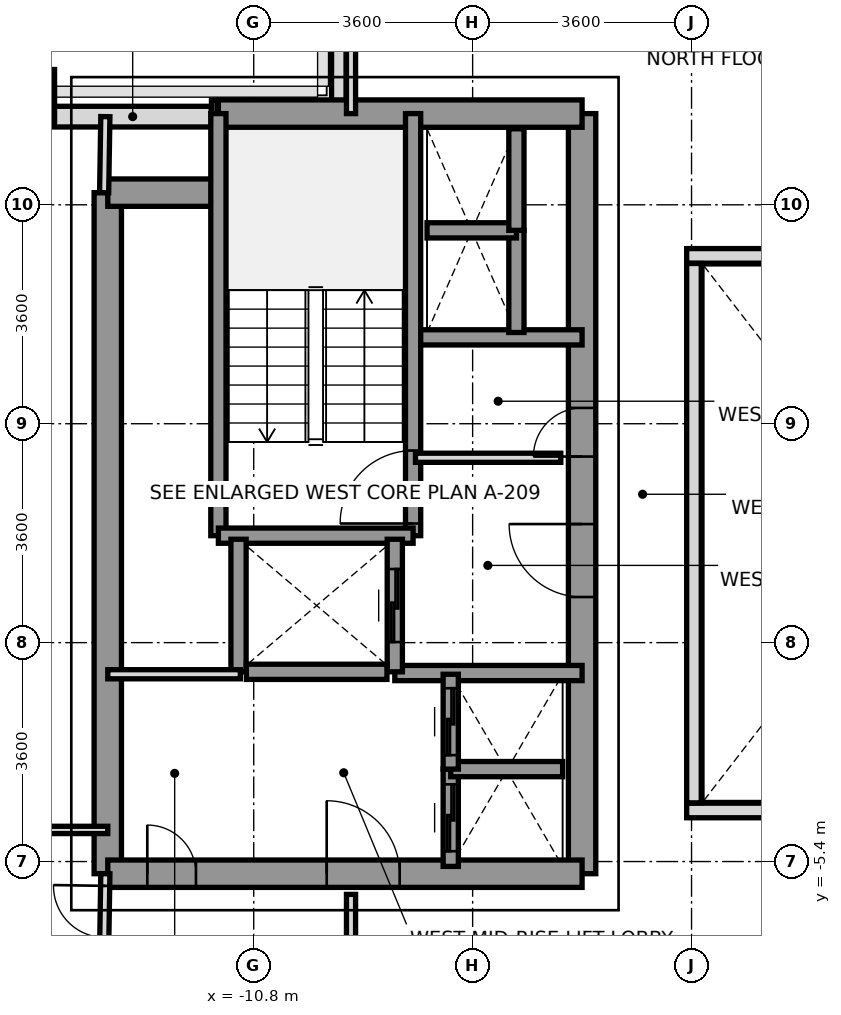
"""IFC4 building model, lengths in metres.
Left out: names, types, materials, properties, quantities, classifications, styles, units other than length and angle.
Written with IfcOpenShell. Run it as: python <this file> out.ifc"""

import sys

from ifc_helpers import new_model, si_unit, direction, frame, frame_2d, origin, origin_2d, place, context, subcontext, project, spatial, rectangle, extrude, source, transform, mapped, element, fill, save


model = new_model("IFC4")
c1 = context("Model", 3, precision=1e-05, world=origin(), true_north=direction((0.0, 1.0)))
c2 = subcontext(c1, "Body", "Model", "MODEL_VIEW")
j1 = project(units=[si_unit("LENGTHUNIT", "METRE"), si_unit("PLANEANGLEUNIT", "RADIAN")], contexts=[c1])
p1 = place(None, origin())
s1 = spatial("IfcSite", under=j1, at=p1, CompositionType="ELEMENT")
p2 = place(p1, origin())
s2 = spatial("IfcBuilding", under=s1, at=p2, CompositionType="ELEMENT")
p3 = place(p2, frame((0.0, 0.0, 148.2)))
s3 = spatial("IfcBuildingStorey", under=s2, at=p3, CompositionType="ELEMENT", Elevation=148.2)
m1 = source(origin(), c2, "Body", "SweptSolid", [
    extrude(rectangle(XDim=0.65, YDim=0.85, at=origin_2d()), origin(), (0.0, 0.0, 1.0), 3.14),
])
p4 = place(p3, frame((-14.4, 7.2, 0.0), z_axis=(0.0, 0.0, 1.0), x_axis=(1.0, 0.0, 0.0)))
e1 = element("IfcColumn", 1, at=p4, inside=s3, PredefinedType="COLUMN", context=c2, shape_type="MappedRepresentation", body=[
    mapped(m1, transform((0.0, 0.0, 0.0), x_axis=(1.0, 0.0, 0.0), y_axis=(0.0, 1.0, 0.0), z_axis=(0.0, 0.0, 1.0), scale=1.0)),
])
p5 = place(p3, frame((-14.083, 6.85, 0.0), z_axis=(0.0, 0.0, 1.0), x_axis=(1.0, 0.0, 0.0)))
e2 = element("IfcWall", 2, at=p5, inside=s3, PredefinedType="SOLIDWALL", context=c2, shape_type="SweptSolid", body=[
    extrude(rectangle(XDim=2.585, YDim=0.34, at=frame_2d((1.292, 0.0))), origin(), (0.0, 0.0, 1.0), 3.14),
])
p6 = place(p3, frame((-11.495, 7.0, 0.0), z_axis=(0.0, 0.0, 1.0), x_axis=(1.0, 0.0, 0.0)))
e3 = element("IfcWall", 3, at=p6, inside=s3, PredefinedType="PARAPET", context=c2, shape_type="SweptSolid", body=[
    extrude(rectangle(XDim=0.092, YDim=0.24, at=frame_2d((0.046, 0.0))), origin(), (0.0, 0.0, 1.0), 1.15),
])
p7 = place(p3, frame((-9.4, 6.953, 0.0), z_axis=(0.0, 0.0, 1.0), x_axis=(0.0, 1.0, 0.0)))
e4 = element("IfcWall", 4, at=p7, inside=s3, PredefinedType="PARAPET", context=c2, shape_type="SweptSolid", body=[
    extrude(rectangle(XDim=1.519, YDim=0.24, at=frame_2d((0.76, 0.0))), origin(), (0.0, 0.0, 1.0), 1.15),
])
p8 = place(p3, frame((-13.2, -5.6, 0.0), z_axis=(0.0, 0.0, 1.0), x_axis=(0.0, 1.0, 0.0)))
e5 = element("IfcWall", 5, at=p8, inside=s3, PredefinedType="SHEAR", context=c2, shape_type="SweptSolid", body=[
    extrude(rectangle(XDim=11.2, YDim=0.45, at=frame_2d((5.6, 0.0))), origin(), (0.0, 0.0, 1.0), 3.14),
])
p9 = place(p3, frame((-5.4, -5.6, 0.0), z_axis=(0.0, 0.0, 1.0), x_axis=(0.0, 1.0, 0.0)))
e6 = element("IfcWall", 6, at=p9, inside=s3, PredefinedType="SHEAR", context=c2, shape_type="SweptSolid", body=[
    extrude(rectangle(XDim=12.5, YDim=0.45, at=frame_2d((6.25, 0.0))), origin(), (0.0, 0.0, 1.0), 3.14),
])
p10 = place(p9, frame((4.55, 0.0, 0.0)))
e7 = element("IfcOpeningElement", 7, at=p10, cuts=e6, PredefinedType="OPENING", context=c2, shape_type="SweptSolid", body=[
    extrude(rectangle(XDim=1.2, YDim=2.2, at=frame_2d((0.6, 1.1))), frame((0.0, 0.235, 0.0), z_axis=(0.0, -1.0, 0.0), x_axis=(1.0, 0.0, 0.0)), (0.0, 0.0, 1.0), 0.47),
])
p11 = place(p9, frame((6.86, 0.0, 0.0)))
e8 = element("IfcOpeningElement", 8, at=p11, cuts=e6, PredefinedType="OPENING", context=c2, shape_type="SweptSolid", body=[
    extrude(rectangle(XDim=0.8, YDim=2.1, at=frame_2d((0.4, 1.05))), frame((0.0, 0.235, 0.0), z_axis=(0.0, -1.0, 0.0), x_axis=(1.0, 0.0, 0.0)), (0.0, 0.0, 1.0), 0.47),
])
p12 = place(p3, frame((-11.381, 6.9, 0.0), z_axis=(0.0, 0.0, 1.0), x_axis=(1.0, 0.0, 0.0)))
e9 = element("IfcWall", 9, at=p12, inside=s3, PredefinedType="SHEAR", context=c2, shape_type="SweptSolid", body=[
    extrude(rectangle(XDim=5.981, YDim=0.45, at=frame_2d((2.991, 0.0))), origin(), (0.0, 0.0, 1.0), 3.14),
])
p13 = place(p3, frame((-13.2, 5.6, 0.0), z_axis=(0.0, 0.0, 1.0), x_axis=(1.0, 0.0, 0.0)))
e10 = element("IfcWall", 10, at=p13, inside=s3, PredefinedType="SHEAR", context=c2, shape_type="SweptSolid", body=[
    extrude(rectangle(XDim=1.819, YDim=0.45, at=frame_2d((0.909, 0.0))), origin(), (0.0, 0.0, 1.0), 3.14),
])
p14 = place(p3, frame((-13.2, -5.6, 0.0), z_axis=(0.0, 0.0, 1.0), x_axis=(1.0, 0.0, 0.0)))
e11 = element("IfcWall", 11, at=p14, inside=s3, PredefinedType="SHEAR", context=c2, shape_type="SweptSolid", body=[
    extrude(rectangle(XDim=7.8, YDim=0.45, at=frame_2d((3.9, 0.0))), origin(), (0.0, 0.0, 1.0), 3.14),
])
p15 = place(p14, frame((3.6, 0.0, 0.0)))
e12 = element("IfcOpeningElement", 12, at=p15, cuts=e11, PredefinedType="OPENING", context=c2, shape_type="SweptSolid", body=[
    extrude(rectangle(XDim=1.2, YDim=2.2, at=frame_2d((0.6, 1.1))), frame((0.0, 0.235, 0.0), z_axis=(0.0, -1.0, 0.0), x_axis=(1.0, 0.0, 0.0)), (0.0, 0.0, 1.0), 0.47),
])
p16 = place(p14, frame((0.65, 0.0, 0.0)))
e13 = element("IfcOpeningElement", 13, at=p16, cuts=e11, PredefinedType="OPENING", context=c2, shape_type="SweptSolid", body=[
    extrude(rectangle(XDim=0.8, YDim=2.1, at=frame_2d((0.4, 1.05))), frame((0.0, 0.235, 0.0), z_axis=(0.0, -1.0, 0.0), x_axis=(1.0, 0.0, 0.0)), (0.0, 0.0, 1.0), 0.47),
])
p17 = place(p3, frame((-8.18, 3.22, 0.0), z_axis=(0.0, 0.0, 1.0), x_axis=(1.0, 0.0, 0.0)))
e14 = element("IfcWall", 14, at=p17, inside=s3, PredefinedType="SOLIDWALL", context=c2, shape_type="SweptSolid", body=[
    extrude(rectangle(XDim=2.78, YDim=0.25, at=frame_2d((1.39, 0.0))), origin(), (0.0, 0.0, 1.0), 3.14),
])
p18 = place(p3, frame((-8.48, -2.3, 0.0), z_axis=(0.0, 0.0, 1.0), x_axis=(1.0, 0.0, 0.0)))
e15 = element("IfcWall", 15, at=p18, inside=s3, PredefinedType="SOLIDWALL", context=c2, shape_type="SweptSolid", body=[
    extrude(rectangle(XDim=3.08, YDim=0.25, at=frame_2d((1.54, 0.0))), origin(), (0.0, 0.0, 1.0), 3.14),
])
p19 = place(p3, frame((-8.179, -0.041, 0.0), z_axis=(0.0, 0.0, 1.0), x_axis=(0.0, 1.0, 0.0)))
e16 = element("IfcWall", 16, at=p19, inside=s3, PredefinedType="SOLIDWALL", context=c2, shape_type="SweptSolid", body=[
    extrude(rectangle(XDim=6.941, YDim=0.25, at=frame_2d((3.47, 0.0))), origin(), (0.0, 0.0, 1.0), 3.14),
])
p20 = place(p19, frame((0.2, 0.0, 0.0)))
e17 = element("IfcOpeningElement", 17, at=p20, cuts=e16, PredefinedType="OPENING", context=c2, shape_type="SweptSolid", body=[
    extrude(rectangle(XDim=1.2, YDim=2.2, at=frame_2d((0.6, 1.1))), frame((0.0, 0.135, 0.0), z_axis=(0.0, -1.0, 0.0), x_axis=(1.0, 0.0, 0.0)), (0.0, 0.0, 1.0), 0.27),
])
p21 = place(p3, frame((-11.381, -0.041, 0.0), z_axis=(0.0, 0.0, 1.0), x_axis=(0.0, 1.0, 0.0)))
e18 = element("IfcWall", 18, at=p21, inside=s3, PredefinedType="SOLIDWALL", context=c2, shape_type="SweptSolid", body=[
    extrude(rectangle(XDim=6.941, YDim=0.25, at=frame_2d((3.47, 0.0))), origin(), (0.0, 0.0, 1.0), 3.14),
])
p22 = place(p3, frame((-11.381, -0.041, 0.0), z_axis=(0.0, 0.0, 1.0), x_axis=(1.0, 0.0, 0.0)))
e19 = element("IfcWall", 19, at=p22, inside=s3, PredefinedType="SOLIDWALL", context=c2, shape_type="SweptSolid", body=[
    extrude(rectangle(XDim=3.202, YDim=0.25, at=frame_2d((1.601, 0.0))), origin(), (0.0, 0.0, 1.0), 3.14),
])
p23 = place(p3, frame((-11.05, -2.28, 0.0), z_axis=(0.0, 0.0, 1.0), x_axis=(0.0, 1.0, 0.0)))
e20 = element("IfcWall", 20, at=p23, inside=s3, PredefinedType="SOLIDWALL", context=c2, shape_type="SweptSolid", body=[
    extrude(rectangle(XDim=2.18, YDim=0.25, at=frame_2d((1.09, 0.0))), origin(), (0.0, 0.0, 1.0), 3.14),
])
p24 = place(p3, frame((-8.48, -2.28, 0.0), z_axis=(0.0, 0.0, 1.0), x_axis=(0.0, 1.0, 0.0)))
e21 = element("IfcWall", 21, at=p24, inside=s3, PredefinedType="SOLIDWALL", context=c2, shape_type="SweptSolid", body=[
    extrude(rectangle(XDim=2.18, YDim=0.25, at=frame_2d((1.09, 0.0))), origin(), (0.0, 0.0, 1.0), 3.14),
])
p25 = place(p24, frame((0.49, 0.0, 0.0)))
e22 = element("IfcOpeningElement", 22, at=p25, cuts=e21, PredefinedType="OPENING", context=c2, shape_type="SweptSolid", body=[
    extrude(rectangle(XDim=1.2, YDim=2.2, at=frame_2d((0.6, 1.1))), frame((0.0, 0.135, 0.0), z_axis=(0.0, -1.0, 0.0), x_axis=(1.0, 0.0, 0.0)), (0.0, 0.0, 1.0), 0.27),
])
p26 = place(p3, frame((-10.921, -2.28, 0.0), z_axis=(0.0, 0.0, 1.0), x_axis=(1.0, 0.0, 0.0)))
e23 = element("IfcWall", 23, at=p26, inside=s3, PredefinedType="SOLIDWALL", context=c2, shape_type="SweptSolid", body=[
    extrude(rectangle(XDim=2.312, YDim=0.25, at=frame_2d((1.156, 0.0))), origin(), (0.0, 0.0, 1.0), 3.14),
])
p27 = place(p3, frame((-7.56, -5.48, 0.0), z_axis=(0.0, 0.0, 1.0), x_axis=(0.0, 1.0, 0.0)))
e24 = element("IfcWall", 24, at=p27, inside=s3, PredefinedType="SOLIDWALL", context=c2, shape_type="SweptSolid", body=[
    extrude(rectangle(XDim=1.6, YDim=0.25, at=frame_2d((0.8, 0.0))), origin(), (0.0, 0.0, 1.0), 3.14),
])
p28 = place(p27, frame((0.25, 0.0, 0.0)))
e25 = element("IfcOpeningElement", 25, at=p28, cuts=e24, PredefinedType="OPENING", context=c2, shape_type="SweptSolid", body=[
    extrude(rectangle(XDim=1.1, YDim=2.2, at=frame_2d((0.55, 1.1))), frame((0.0, 0.135, 0.0), z_axis=(0.0, -1.0, 0.0), x_axis=(1.0, 0.0, 0.0)), (0.0, 0.0, 1.0), 0.27),
])
p29 = place(p3, frame((-7.56, -3.88, 0.0), z_axis=(0.0, 0.0, 1.0), x_axis=(1.0, 0.0, 0.0)))
e26 = element("IfcWall", 26, at=p29, inside=s3, PredefinedType="SOLIDWALL", context=c2, shape_type="SweptSolid", body=[
    extrude(rectangle(XDim=1.84, YDim=0.25, at=frame_2d((0.92, 0.0))), origin(), (0.0, 0.0, 1.0), 3.14),
])
p30 = place(p3, frame((-7.56, -3.88, 0.0), z_axis=(0.0, 0.0, 1.0), x_axis=(0.0, 1.0, 0.0)))
e27 = element("IfcWall", 27, at=p30, inside=s3, PredefinedType="SOLIDWALL", context=c2, shape_type="SweptSolid", body=[
    extrude(rectangle(XDim=1.56, YDim=0.25, at=frame_2d((0.78, 0.0))), origin(), (0.0, 0.0, 1.0), 3.14),
])
p31 = place(p30, frame((0.23, 0.0, 0.0)))
e28 = element("IfcOpeningElement", 28, at=p31, cuts=e27, PredefinedType="OPENING", context=c2, shape_type="SweptSolid", body=[
    extrude(rectangle(XDim=1.1, YDim=2.2, at=frame_2d((0.55, 1.1))), frame((0.0, 0.135, 0.0), z_axis=(0.0, -1.0, 0.0), x_axis=(1.0, 0.0, 0.0)), (0.0, 0.0, 1.0), 0.27),
])
p32 = place(p3, frame((-6.48, 3.3, 0.0), z_axis=(0.0, 0.0, 1.0), x_axis=(0.0, 1.0, 0.0)))
e29 = element("IfcWall", 29, at=p32, inside=s3, PredefinedType="SOLIDWALL", context=c2, shape_type="SweptSolid", body=[
    extrude(rectangle(XDim=1.68, YDim=0.25, at=frame_2d((0.84, 0.0))), origin(), (0.0, 0.0, 1.0), 3.14),
])
p33 = place(p3, frame((-7.95, 4.98, 0.0), z_axis=(0.0, 0.0, 1.0), x_axis=(1.0, 0.0, 0.0)))
e30 = element("IfcWall", 30, at=p33, inside=s3, PredefinedType="SOLIDWALL", context=c2, shape_type="SweptSolid", body=[
    extrude(rectangle(XDim=1.47, YDim=0.25, at=frame_2d((0.735, 0.0))), origin(), (0.0, 0.0, 1.0), 3.14),
])
p34 = place(p3, frame((-6.48, 4.98, 0.0), z_axis=(0.0, 0.0, 1.0), x_axis=(0.0, 1.0, 0.0)))
e31 = element("IfcWall", 31, at=p34, inside=s3, PredefinedType="SOLIDWALL", context=c2, shape_type="SweptSolid", body=[
    extrude(rectangle(XDim=1.67, YDim=0.25, at=frame_2d((0.835, 0.0))), origin(), (0.0, 0.0, 1.0), 3.14),
])
p35 = place(p3, frame((-8.14, 1.24, 0.0), z_axis=(0.0, 0.0, 1.0), x_axis=(1.0, 0.0, 0.0)))
e32 = element("IfcWall", 32, at=p35, inside=s3, PredefinedType="PARTITIONING", context=c2, shape_type="SweptSolid", body=[
    extrude(rectangle(XDim=2.39, YDim=0.15, at=frame_2d((1.195, 0.0))), origin(), (0.0, 0.0, 1.0), 2.24),
])
p36 = place(p3, frame((-13.2, -2.32, 0.0), z_axis=(0.0, 0.0, 1.0), x_axis=(1.0, 0.0, 0.0)))
e33 = element("IfcWall", 33, at=p36, inside=s3, PredefinedType="PARTITIONING", context=c2, shape_type="SweptSolid", body=[
    extrude(rectangle(XDim=2.18, YDim=0.15, at=frame_2d((1.09, 0.0))), origin(), (0.0, 0.0, 1.0), 3.14),
])
p37 = place(p3, frame((-9.2, 6.9, 0.0), z_axis=(0.0, 0.0, 1.0), x_axis=(0.0, 1.0, 0.0)))
e34 = element("IfcWall", 34, at=p37, inside=s3, PredefinedType="PARTITIONING", context=c2, shape_type="SweptSolid", body=[
    extrude(rectangle(XDim=8.78, YDim=0.15, at=frame_2d((4.39, 0.0))), origin(), (0.0, 0.0, 1.0), 2.64),
])
p38 = place(p3, frame((-9.2, -15.68, 0.0), z_axis=(0.0, 0.0, 1.0), x_axis=(0.0, 1.0, 0.0)))
e35 = element("IfcWall", 35, at=p38, inside=s3, PredefinedType="PARTITIONING", context=c2, shape_type="SweptSolid", body=[
    extrude(rectangle(XDim=9.74, YDim=0.15, at=frame_2d((4.87, 0.0))), origin(), (0.0, 0.0, 1.0), 2.64),
])
p39 = place(p3, frame((-13.26, 5.6, 0.0), z_axis=(0.0, 0.0, 1.0), x_axis=(0.016013571389, 0.999871774545, 0.0)))
e36 = element("IfcWall", 36, at=p39, inside=s3, PredefinedType="PARTITIONING", context=c2, shape_type="SweptSolid", body=[
    extrude(rectangle(XDim=1.25, YDim=0.15, at=frame_2d((0.625, 0.0))), origin(), (0.0, 0.0, 1.0), 3.14),
])
p40 = place(p3, frame((-13.26, -6.85, 0.0), z_axis=(0.0, 0.0, 1.0), x_axis=(0.016013571389, 0.999871774545, 0.0)))
e37 = element("IfcWall", 37, at=p40, inside=s3, PredefinedType="PARTITIONING", context=c2, shape_type="SweptSolid", body=[
    extrude(rectangle(XDim=1.25, YDim=0.15, at=frame_2d((0.625, 0.0))), origin(), (0.0, 0.0, 1.0), 3.14),
])
p41 = place(p40, frame((0.2, 0.0, 0.0)))
e38 = element("IfcOpeningElement", 38, at=p41, cuts=e37, PredefinedType="OPENING", context=c2, shape_type="SweptSolid", body=[
    extrude(rectangle(XDim=0.85, YDim=2.1, at=frame_2d((0.425, 1.05))), frame((0.0, 0.085, 0.0), z_axis=(0.0, -1.0, 0.0), x_axis=(1.0, 0.0, 0.0)), (0.0, 0.0, 1.0), 0.17),
])
p42 = place(p3, frame((-19.17, -4.88, 0.0), z_axis=(0.0, 0.0, 1.0), x_axis=(1.0, 0.0, 0.0)))
e39 = element("IfcWall", 39, at=p42, inside=s3, PredefinedType="PARTITIONING", context=c2, shape_type="SweptSolid", body=[
    extrude(rectangle(XDim=5.97, YDim=0.12, at=frame_2d((2.985, 0.0))), origin(), (0.0, 0.0, 1.0), 2.69),
])
p43 = place(p42, frame((1.45, 0.0, 0.0)))
e40 = element("IfcOpeningElement", 40, at=p43, cuts=e39, PredefinedType="OPENING", context=c2, shape_type="SweptSolid", body=[
    extrude(rectangle(XDim=0.95, YDim=2.15, at=frame_2d((0.475, 1.075))), frame((0.0, 0.07, 0.0), z_axis=(0.0, -1.0, 0.0), x_axis=(1.0, 0.0, 0.0)), (0.0, 0.0, 1.0), 0.14),
])
for number, where, z_axis, x_axis in (
    (41, (-3.68, -4.56, 0.0), (0.0, 0.0, 1.0), (1.0, 0.0, 0.0)),
    (42, (-3.68, 4.56, 0.0), (0.0, 0.0, 1.0), (1.0, 0.0, 0.0)),
):
    element("IfcWall", number, at=place(p3, frame(where, z_axis=z_axis, x_axis=x_axis)), inside=s3, PredefinedType="PARAPET", context=c2, shape_type="SweptSolid", body=[
        extrude(rectangle(XDim=7.36, YDim=0.24, at=frame_2d((3.68, 0.0))), origin(), (0.0, 0.0, 1.0), 1.15),
    ])
p44 = place(p3, frame((-3.56, -4.435, 0.0), z_axis=(0.0, 0.0, 1.0), x_axis=(0.0, 1.0, 0.0)))
e43 = element("IfcWall", 43, at=p44, inside=s3, PredefinedType="PARAPET", context=c2, shape_type="SweptSolid", body=[
    extrude(rectangle(XDim=8.87, YDim=0.24, at=frame_2d((4.435, 0.0))), origin(), (0.0, 0.0, 1.0), 1.15),
])
m2 = source(origin(), c2, "Body", "SweptSolid", [
    extrude(rectangle(XDim=1.2, YDim=2.2, at=frame_2d((0.6, 1.1))), frame((0.0, 0.025, 0.0), z_axis=(0.0, -1.0, 0.0), x_axis=(1.0, 0.0, 0.0)), (0.0, 0.0, 1.0), 0.05),
])
p45 = place(p20, origin())
e44 = element("IfcDoor", 44, at=p45, inside=s3, OperationType="SINGLE_SWING_LEFT", PredefinedType="DOOR", context=c2, shape_type="MappedRepresentation", body=[
    mapped(m2, transform((0.0, 0.0, 0.0), x_axis=(1.0, 0.0, 0.0), y_axis=(0.0, 1.0, 0.0), z_axis=(0.0, 0.0, 1.0), scale=1.0)),
])
fill(e17, e44)
p46 = place(p10, origin())
e45 = element("IfcDoor", 45, at=p46, inside=s3, OperationType="SINGLE_SWING_RIGHT", PredefinedType="DOOR", context=c2, shape_type="MappedRepresentation", body=[
    mapped(m2, transform((0.0, 0.0, 0.0), x_axis=(1.0, 0.0, 0.0), y_axis=(0.0, 1.0, 0.0), z_axis=(0.0, 0.0, 1.0), scale=1.0)),
])
fill(e7, e45)
p47 = place(p15, origin())
e46 = element("IfcDoor", 46, at=p47, inside=s3, OperationType="SINGLE_SWING_LEFT", PredefinedType="DOOR", context=c2, shape_type="MappedRepresentation", body=[
    mapped(m2, transform((0.0, 0.0, 0.0), x_axis=(1.0, 0.0, 0.0), y_axis=(0.0, 1.0, 0.0), z_axis=(0.0, 0.0, 1.0), scale=1.0)),
])
fill(e12, e46)
m3 = source(origin(), c2, "Body", "SweptSolid", [
    extrude(rectangle(XDim=0.8, YDim=2.1, at=frame_2d((0.4, 1.05))), frame((0.0, 0.025, 0.0), z_axis=(0.0, -1.0, 0.0), x_axis=(1.0, 0.0, 0.0)), (0.0, 0.0, 1.0), 0.05),
])
p48 = place(p11, origin())
e47 = element("IfcDoor", 47, at=p48, inside=s3, OperationType="SINGLE_SWING_LEFT", PredefinedType="DOOR", context=c2, shape_type="MappedRepresentation", body=[
    mapped(m3, transform((0.0, 0.0, 0.0), x_axis=(1.0, 0.0, 0.0), y_axis=(0.0, 1.0, 0.0), z_axis=(0.0, 0.0, 1.0), scale=1.0)),
])
fill(e8, e47)
p49 = place(p16, origin())
e48 = element("IfcDoor", 48, at=p49, inside=s3, OperationType="SINGLE_SWING_LEFT", PredefinedType="DOOR", context=c2, shape_type="MappedRepresentation", body=[
    mapped(m3, transform((0.0, 0.0, 0.0), x_axis=(1.0, 0.0, 0.0), y_axis=(0.0, 1.0, 0.0), z_axis=(0.0, 0.0, 1.0), scale=1.0)),
])
fill(e13, e48)
p50 = place(p25, origin())
e49 = element("IfcDoor", 49, at=p50, inside=s3, OperationType="SLIDING_TO_RIGHT", PredefinedType="DOOR", context=c2, shape_type="MappedRepresentation", body=[
    mapped(m2, transform((0.0, 0.0, 0.0), x_axis=(1.0, 0.0, 0.0), y_axis=(0.0, 1.0, 0.0), z_axis=(0.0, 0.0, 1.0), scale=1.0)),
])
fill(e22, e49)
m4 = source(origin(), c2, "Body", "SweptSolid", [
    extrude(rectangle(XDim=1.1, YDim=2.2, at=frame_2d((0.55, 1.1))), frame((0.0, 0.025, 0.0), z_axis=(0.0, -1.0, 0.0), x_axis=(1.0, 0.0, 0.0)), (0.0, 0.0, 1.0), 0.05),
])
p51 = place(p28, origin())
e50 = element("IfcDoor", 50, at=p51, inside=s3, OperationType="SLIDING_TO_LEFT", PredefinedType="DOOR", context=c2, shape_type="MappedRepresentation", body=[
    mapped(m4, transform((0.0, 0.0, 0.0), x_axis=(1.0, 0.0, 0.0), y_axis=(0.0, 1.0, 0.0), z_axis=(0.0, 0.0, 1.0), scale=1.0)),
])
fill(e25, e50)
p52 = place(p31, origin())
e51 = element("IfcDoor", 51, at=p52, inside=s3, OperationType="SLIDING_TO_LEFT", PredefinedType="DOOR", context=c2, shape_type="MappedRepresentation", body=[
    mapped(m4, transform((0.0, 0.0, 0.0), x_axis=(1.0, 0.0, 0.0), y_axis=(0.0, 1.0, 0.0), z_axis=(0.0, 0.0, 1.0), scale=1.0)),
])
fill(e28, e51)
m5 = source(origin(), c2, "Body", "SweptSolid", [
    extrude(rectangle(XDim=0.85, YDim=2.1, at=frame_2d((0.425, 1.05))), frame((0.0, 0.025, 0.0), z_axis=(0.0, -1.0, 0.0), x_axis=(1.0, 0.0, 0.0)), (0.0, 0.0, 1.0), 0.05),
])
p53 = place(p41, origin())
e52 = element("IfcDoor", 52, at=p53, inside=s3, OperationType="SINGLE_SWING_RIGHT", PredefinedType="DOOR", context=c2, shape_type="MappedRepresentation", body=[
    mapped(m5, transform((0.0, 0.0, 0.0), x_axis=(1.0, 0.0, 0.0), y_axis=(0.0, 1.0, 0.0), z_axis=(0.0, 0.0, 1.0), scale=1.0)),
])
fill(e38, e52)
save(model, sys.argv[1])
